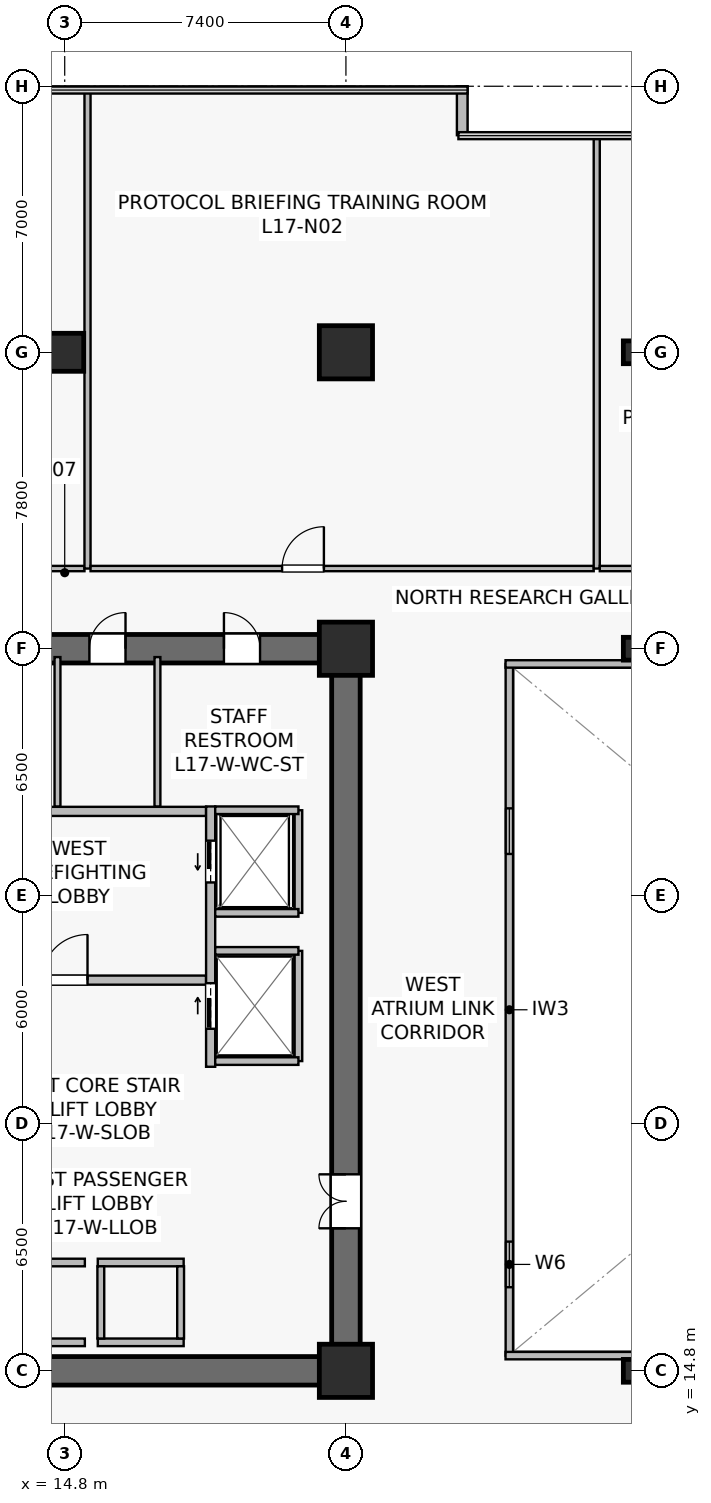
"""IFC4 building model, lengths in metres.
Left out: names, types, materials, properties, quantities, classifications, styles, units other than length and angle.
Written with IfcOpenShell. Run it as: python <this file> out.ifc"""

import sys

from ifc_helpers import new_model, si_unit, direction, frame, frame_2d, origin, origin_2d, place, context, subcontext, project, spatial, rectangle, hollow_rectangle, extrude, source, transform, mapped, element, fill, save


model = new_model("IFC4")
c1 = context("Model", 3, precision=1e-05, world=origin(), true_north=direction((0.0, 1.0)))
c2 = subcontext(c1, "Body", "Model", "MODEL_VIEW")
j1 = project(units=[si_unit("LENGTHUNIT", "METRE"), si_unit("PLANEANGLEUNIT", "RADIAN")], contexts=[c1])
p1 = place(None, origin())
s1 = spatial("IfcSite", under=j1, at=p1, CompositionType="ELEMENT")
p2 = place(p1, origin())
s2 = spatial("IfcBuilding", under=s1, at=p2, CompositionType="ELEMENT")
p3 = place(p2, frame((0.0, 0.0, 70.3)))
s3 = spatial("IfcBuildingStorey", under=s2, at=p3, CompositionType="ELEMENT", Elevation=70.3)
p4 = place(p3, frame((7.025, 14.8, 0.0), z_axis=(0.0, 0.0, 1.0), x_axis=(1.0, 0.0, 0.0)))
e1 = element("IfcWall", 1, at=p4, inside=s3, PredefinedType="SHEAR", context=c2, shape_type="SweptSolid", body=[
    extrude(rectangle(XDim=15.55, YDim=0.75, at=frame_2d((7.775, 0.0))), origin(), (0.0, 0.0, 1.0), 3.78),
])
p5 = place(p3, frame((7.025, 33.8, 0.0), z_axis=(0.0, 0.0, 1.0), x_axis=(1.0, 0.0, 0.0)))
e2 = element("IfcWall", 2, at=p5, inside=s3, PredefinedType="SHEAR", context=c2, shape_type="SweptSolid", body=[
    extrude(rectangle(XDim=15.55, YDim=0.75, at=frame_2d((7.775, 0.0))), origin(), (0.0, 0.0, 1.0), 3.78),
])
p6 = place(p5, frame((8.425, 0.0, 0.0)))
e3 = element("IfcOpeningElement", 3, at=p6, cuts=e2, PredefinedType="OPENING", context=c2, shape_type="SweptSolid", body=[
    extrude(rectangle(XDim=0.95, YDim=2.15, at=frame_2d((0.475, 1.075))), frame((0.0, 0.385, 0.0), z_axis=(0.0, -1.0, 0.0), x_axis=(1.0, 0.0, 0.0)), (0.0, 0.0, 1.0), 0.77),
])
p7 = place(p5, frame((11.965, 0.0, 0.0)))
e4 = element("IfcOpeningElement", 4, at=p7, cuts=e2, PredefinedType="OPENING", context=c2, shape_type="SweptSolid", body=[
    extrude(rectangle(XDim=0.95, YDim=2.15, at=frame_2d((0.475, 1.075))), frame((0.0, 0.385, 0.0), z_axis=(0.0, -1.0, 0.0), x_axis=(1.0, 0.0, 0.0)), (0.0, 0.0, 1.0), 0.77),
])
p8 = place(p3, frame((22.2, 15.175, 0.0), z_axis=(0.0, 0.0, 1.0), x_axis=(0.0, 1.0, 0.0)))
e5 = element("IfcWall", 5, at=p8, inside=s3, PredefinedType="SHEAR", context=c2, shape_type="SweptSolid", body=[
    extrude(rectangle(XDim=18.25, YDim=0.75, at=frame_2d((9.125, 0.0))), origin(), (0.0, 0.0, 1.0), 3.78),
])
p9 = place(p8, frame((3.375, 0.0, 0.0)))
e6 = element("IfcOpeningElement", 6, at=p9, cuts=e5, PredefinedType="OPENING", context=c2, shape_type="SweptSolid", body=[
    extrude(rectangle(XDim=1.42, YDim=2.2, at=frame_2d((0.71, 1.1))), frame((0.0, 0.385, 0.0), z_axis=(0.0, -1.0, 0.0), x_axis=(1.0, 0.0, 0.0)), (0.0, 0.0, 1.0), 0.77),
])
m1 = source(origin(), c2, "Body", "SweptSolid", [
    extrude(rectangle(XDim=1.4, YDim=1.4, at=origin_2d()), origin(), (0.0, 0.0, 1.0), 4.1),
])
for number, where, z_axis, x_axis in (
    (7, (22.2, 14.8, 0.0), (0.0, 0.0, 1.0), (1.0, 0.0, 0.0)),
    (8, (22.2, 33.8, 0.0), (0.0, 0.0, 1.0), (1.0, 0.0, 0.0)),
):
    element("IfcColumn", number, at=place(p3, frame(where, z_axis=z_axis, x_axis=x_axis)), inside=s3, PredefinedType="COLUMN", context=c2, shape_type="MappedRepresentation", body=[
        mapped(m1, transform((0.0, 0.0, 0.0), scale=1.0)),
    ])
m2 = source(origin(), c2, "Body", "SweptSolid", [
    extrude(rectangle(XDim=1.0, YDim=1.0, at=origin_2d()), origin(), (0.0, 0.0, 1.0), 4.1),
])
p10 = place(p3, frame((14.8, 41.6, 0.0), z_axis=(0.0, 0.0, 1.0), x_axis=(1.0, 0.0, 0.0)))
e9 = element("IfcColumn", 9, at=p10, inside=s3, PredefinedType="COLUMN", context=c2, shape_type="MappedRepresentation", body=[
    mapped(m2, transform((0.0, 0.0, 0.0), scale=1.0)),
])
p11 = place(p3, frame((22.2, 41.6, 0.0), z_axis=(0.0, 0.0, 1.0), x_axis=(1.0, 0.0, 0.0)))
e10 = element("IfcColumn", 10, at=p11, inside=s3, PredefinedType="COLUMN", context=c2, shape_type="MappedRepresentation", body=[
    mapped(m1, transform((0.0, 0.0, 0.0), scale=1.0)),
])
m3 = source(origin(), c2, "Body", "SweptSolid", [
    extrude(hollow_rectangle(XDim=0.6, YDim=0.6, WallThickness=0.028, at=origin_2d()), origin(), (0.0, 0.0, 1.0), 4.1),
])
for number, where, z_axis, x_axis in (
    (11, (29.8, 14.8, 0.0), (0.0, 0.0, 1.0), (1.0, 0.0, 0.0)),
    (12, (29.8, 33.8, 0.0), (0.0, 0.0, 1.0), (1.0, 0.0, 0.0)),
    (13, (29.8, 41.6, 0.0), (0.0, 0.0, 1.0), (1.0, 0.0, 0.0)),
):
    element("IfcColumn", number, at=place(p3, frame(where, z_axis=z_axis, x_axis=x_axis)), inside=s3, PredefinedType="COLUMN", context=c2, shape_type="MappedRepresentation", body=[
        mapped(m3, transform((0.0, 0.0, 0.0), scale=1.0)),
    ])
p12 = place(p3, frame((25.26, 47.312, 0.0), z_axis=(0.0, 0.0, 1.0), x_axis=(0.0, 1.0, 0.0)))
e14 = element("IfcWall", 14, at=p12, inside=s3, PredefinedType="STANDARD", context=c2, shape_type="SweptSolid", body=[
    extrude(rectangle(XDim=1.288, YDim=0.28, at=frame_2d((0.644, 0.0))), origin(), (0.0, 0.0, 1.0), 3.78),
])
p13 = place(p3, frame((11.6, 25.08, 0.0), z_axis=(0.0, 0.0, 1.0), x_axis=(1.0, 0.0, 0.0)))
e15 = element("IfcWall", 15, at=p13, inside=s3, PredefinedType="SOLIDWALL", context=c2, shape_type="SweptSolid", body=[
    extrude(rectangle(XDim=6.92, YDim=0.24, at=frame_2d((3.46, 0.0))), origin(), (0.0, 0.0, 1.0), 3.115),
])
p14 = place(p13, frame((2.6, 0.0, 0.0)))
e16 = element("IfcOpeningElement", 16, at=p14, cuts=e15, PredefinedType="OPENING", context=c2, shape_type="SweptSolid", body=[
    extrude(rectangle(XDim=1.2, YDim=2.16, at=frame_2d((0.6, 1.08))), frame((0.0, 0.13, 0.0), z_axis=(0.0, -1.0, 0.0), x_axis=(1.0, 0.0, 0.0)), (0.0, 0.0, 1.0), 0.26),
])
p15 = place(p3, frame((11.6, 29.52, 0.0), z_axis=(0.0, 0.0, 1.0), x_axis=(1.0, 0.0, 0.0)))
e17 = element("IfcWall", 17, at=p15, inside=s3, PredefinedType="SOLIDWALL", context=c2, shape_type="SweptSolid", body=[
    extrude(rectangle(XDim=6.92, YDim=0.24, at=frame_2d((3.46, 0.0))), origin(), (0.0, 0.0, 1.0), 3.115),
])
p16 = place(p3, frame((18.64, 22.8, 0.0), z_axis=(0.0, 0.0, 1.0), x_axis=(0.0, 1.0, 0.0)))
e18 = element("IfcWall", 18, at=p16, inside=s3, PredefinedType="SOLIDWALL", context=c2, shape_type="SweptSolid", body=[
    extrude(rectangle(XDim=6.85, YDim=0.24, at=frame_2d((3.425, 0.0))), origin(), (0.0, 0.0, 1.0), 2.865),
])
p17 = place(p16, frame((4.85, 0.0, 0.0)))
e19 = element("IfcOpeningElement", 19, at=p17, cuts=e18, PredefinedType="OPENING", context=c2, shape_type="SweptSolid", body=[
    extrude(rectangle(XDim=1.1, YDim=2.22, at=frame_2d((0.55, 1.11))), frame((0.0, 0.13, 0.0), z_axis=(0.0, -1.0, 0.0), x_axis=(1.0, 0.0, 0.0)), (0.0, 0.0, 1.0), 0.26),
])
p18 = place(p16, frame((1.0, 0.0, 0.0)))
e20 = element("IfcOpeningElement", 20, at=p18, cuts=e18, PredefinedType="OPENING", context=c2, shape_type="SweptSolid", body=[
    extrude(rectangle(XDim=1.2, YDim=2.22, at=frame_2d((0.6, 1.11))), frame((0.0, 0.13, 0.0), z_axis=(0.0, -1.0, 0.0), x_axis=(1.0, 0.0, 0.0)), (0.0, 0.0, 1.0), 0.26),
])
for number, where, z_axis, x_axis in (
    (21, (13.07, 17.65, 0.0), (0.0, 0.0, 1.0), (1.0, 0.0, 0.0)),
    (22, (13.07, 15.55, 0.0), (0.0, 0.0, 1.0), (1.0, 0.0, 0.0)),
):
    element("IfcWall", number, at=place(p3, frame(where, z_axis=z_axis, x_axis=x_axis)), inside=s3, PredefinedType="SOLIDWALL", context=c2, shape_type="SweptSolid", body=[
        extrude(rectangle(XDim=2.26, YDim=0.2, at=frame_2d((1.13, 0.0))), origin(), (0.0, 0.0, 1.0), 3.115),
    ])
for number, where, z_axis, x_axis in (
    (23, (15.67, 17.65, 0.0), (0.0, 0.0, 1.0), (1.0, 0.0, 0.0)),
    (24, (15.67, 15.55, 0.0), (0.0, 0.0, 1.0), (1.0, 0.0, 0.0)),
):
    element("IfcWall", number, at=place(p3, frame(where, z_axis=z_axis, x_axis=x_axis)), inside=s3, PredefinedType="SOLIDWALL", context=c2, shape_type="SweptSolid", body=[
        extrude(rectangle(XDim=2.26, YDim=0.2, at=frame_2d((1.13, 0.0))), origin(), (0.0, 0.0, 1.0), 3.78),
    ])
for number, where, z_axis, x_axis in (
    (25, (15.75, 15.65, 0.0), (0.0, 0.0, 1.0), (0.0, 1.0, 0.0)),
    (26, (17.85, 15.65, 0.0), (0.0, 0.0, 1.0), (0.0, 1.0, 0.0)),
):
    element("IfcWall", number, at=place(p3, frame(where, z_axis=z_axis, x_axis=x_axis)), inside=s3, PredefinedType="SOLIDWALL", context=c2, shape_type="SweptSolid", body=[
        extrude(rectangle(XDim=1.9, YDim=0.18, at=frame_2d((0.95, 0.0))), origin(), (0.0, 0.0, 1.0), 3.78),
    ])
p19 = place(p3, frame((20.95, 26.85, 0.0), z_axis=(0.0, 0.0, 1.0), x_axis=(0.0, 1.0, 0.0)))
e27 = element("IfcWall", 27, at=p19, inside=s3, PredefinedType="SOLIDWALL", context=c2, shape_type="SweptSolid", body=[
    extrude(rectangle(XDim=2.7, YDim=0.2, at=frame_2d((1.35, 0.0))), origin(), (0.0, 0.0, 1.0), 3.78),
])
p20 = place(p3, frame((18.76, 29.55, 0.0), z_axis=(0.0, 0.0, 1.0), x_axis=(1.0, 0.0, 0.0)))
e28 = element("IfcWall", 28, at=p20, inside=s3, PredefinedType="SOLIDWALL", context=c2, shape_type="SweptSolid", body=[
    extrude(rectangle(XDim=2.19, YDim=0.2, at=frame_2d((1.095, 0.0))), origin(), (0.0, 0.0, 1.0), 3.78),
])
p21 = place(p3, frame((18.76, 26.85, 0.0), z_axis=(0.0, 0.0, 1.0), x_axis=(1.0, 0.0, 0.0)))
e29 = element("IfcWall", 29, at=p21, inside=s3, PredefinedType="SOLIDWALL", context=c2, shape_type="SweptSolid", body=[
    extrude(rectangle(XDim=2.19, YDim=0.2, at=frame_2d((1.095, 0.0))), origin(), (0.0, 0.0, 1.0), 3.177),
])
p22 = place(p3, frame((20.95, 22.95, 0.0), z_axis=(0.0, 0.0, 1.0), x_axis=(0.0, 1.0, 0.0)))
e30 = element("IfcWall", 30, at=p22, inside=s3, PredefinedType="SOLIDWALL", context=c2, shape_type="SweptSolid", body=[
    extrude(rectangle(XDim=2.9, YDim=0.2, at=frame_2d((1.45, 0.0))), origin(), (0.0, 0.0, 1.0), 2.865),
])
for number, where, z_axis, x_axis in (
    (31, (18.76, 25.85, 0.0), (0.0, 0.0, 1.0), (1.0, 0.0, 0.0)),
    (32, (18.76, 22.95, 0.0), (0.0, 0.0, 1.0), (1.0, 0.0, 0.0)),
):
    element("IfcWall", number, at=place(p3, frame(where, z_axis=z_axis, x_axis=x_axis)), inside=s3, PredefinedType="SOLIDWALL", context=c2, shape_type="SweptSolid", body=[
        extrude(rectangle(XDim=2.19, YDim=0.2, at=frame_2d((1.095, 0.0))), origin(), (0.0, 0.0, 1.0), 3.78),
    ])
p23 = place(p3, frame((14.61, 29.65, 0.0), z_axis=(0.0, 0.0, 1.0), x_axis=(0.0, 1.0, 0.0)))
e33 = element("IfcWall", 33, at=p23, inside=s3, PredefinedType="PLUMBINGWALL", context=c2, shape_type="SweptSolid", body=[
    extrude(rectangle(XDim=3.93, YDim=0.155, at=frame_2d((1.965, 0.0))), origin(), (0.0, 0.0, 1.0), 3.115),
])
p24 = place(p3, frame((17.24, 29.65, 0.0), z_axis=(0.0, 0.0, 1.0), x_axis=(0.0, 1.0, 0.0)))
e34 = element("IfcWall", 34, at=p24, inside=s3, PredefinedType="PLUMBINGWALL", context=c2, shape_type="SweptSolid", body=[
    extrude(rectangle(XDim=3.93, YDim=0.155, at=frame_2d((1.965, 0.0))), origin(), (0.0, 0.0, 1.0), 3.78),
])
p25 = place(p3, frame((26.5, 15.2, 0.0), z_axis=(0.0, 0.0, 1.0), x_axis=(0.0, 1.0, 0.0)))
e35 = element("IfcWall", 35, at=p25, inside=s3, PredefinedType="SOLIDWALL", context=c2, shape_type="SweptSolid", body=[
    extrude(rectangle(XDim=18.2, YDim=0.195, at=frame_2d((9.1, 0.0))), origin(), (0.0, 0.0, 1.0), 3.78),
])
p26 = place(p25, frame((1.8, 0.0, 0.9)))
e36 = element("IfcOpeningElement", 36, at=p26, cuts=e35, PredefinedType="OPENING", context=c2, shape_type="SweptSolid", body=[
    extrude(rectangle(XDim=1.2, YDim=1.35, at=frame_2d((0.6, 0.675))), frame((0.0, 0.107, 0.0), z_axis=(0.0, -1.0, 0.0), x_axis=(1.0, 0.0, 0.0)), (0.0, 0.0, 1.0), 0.215),
])
p27 = place(p25, frame((13.2, 0.0, 0.9)))
e37 = element("IfcOpeningElement", 37, at=p27, cuts=e35, PredefinedType="OPENING", context=c2, shape_type="SweptSolid", body=[
    extrude(rectangle(XDim=1.2, YDim=1.35, at=frame_2d((0.6, 0.675))), frame((0.0, 0.107, 0.0), z_axis=(0.0, -1.0, 0.0), x_axis=(1.0, 0.0, 0.0)), (0.0, 0.0, 1.0), 0.215),
])
for number, where, z_axis, x_axis in (
    (38, (26.4, 15.2, 0.0), (0.0, 0.0, 1.0), (1.0, 0.0, 0.0)),
    (39, (26.4, 33.4, 0.0), (0.0, 0.0, 1.0), (1.0, 0.0, 0.0)),
):
    element("IfcWall", number, at=place(p3, frame(where, z_axis=z_axis, x_axis=x_axis)), inside=s3, PredefinedType="SOLIDWALL", context=c2, shape_type="SweptSolid", body=[
        extrude(rectangle(XDim=22.0, YDim=0.195, at=frame_2d((11.0, 0.0))), origin(), (0.0, 0.0, 1.0), 3.78),
    ])
p28 = place(p3, frame((6.98, 35.91, 0.0), z_axis=(0.0, 0.0, 1.0), x_axis=(1.0, 0.0, 0.0)))
e40 = element("IfcWall", 40, at=p28, inside=s3, PredefinedType="PARTITIONING", context=c2, shape_type="SweptSolid", body=[
    extrude(rectangle(XDim=8.34, YDim=0.14, at=frame_2d((4.17, 0.0))), origin(), (0.0, 0.0, 1.0), 3.115),
])
p29 = place(p28, frame((3.816, 0.0, 0.0)))
e41 = element("IfcOpeningElement", 41, at=p29, cuts=e40, PredefinedType="OPENING", context=c2, shape_type="SweptSolid", body=[
    extrude(rectangle(XDim=1.1, YDim=2.18, at=frame_2d((0.55, 1.09))), frame((0.0, 0.08, 0.0), z_axis=(0.0, -1.0, 0.0), x_axis=(1.0, 0.0, 0.0)), (0.0, 0.0, 1.0), 0.16),
])
p30 = place(p3, frame((15.4, 35.91, 0.0), z_axis=(0.0, 0.0, 1.0), x_axis=(0.0, 1.0, 0.0)))
e42 = element("IfcWall", 42, at=p30, inside=s3, PredefinedType="PARTITIONING", context=c2, shape_type="SweptSolid", body=[
    extrude(rectangle(XDim=12.58, YDim=0.16, at=frame_2d((6.29, 0.0))), origin(), (0.0, 0.0, 1.0), 3.015),
])
p31 = place(p3, frame((15.48, 35.91, 0.0), z_axis=(0.0, 0.0, 1.0), x_axis=(1.0, 0.0, 0.0)))
e43 = element("IfcWall", 43, at=p31, inside=s3, PredefinedType="PARTITIONING", context=c2, shape_type="SweptSolid", body=[
    extrude(rectangle(XDim=13.24, YDim=0.14, at=frame_2d((6.62, 0.0))), origin(), (0.0, 0.0, 1.0), 3.115),
])
p32 = place(p31, frame((5.04, 0.0, 0.0)))
e44 = element("IfcOpeningElement", 44, at=p32, cuts=e43, PredefinedType="OPENING", context=c2, shape_type="SweptSolid", body=[
    extrude(rectangle(XDim=1.1, YDim=2.18, at=frame_2d((0.55, 1.09))), frame((0.0, 0.08, 0.0), z_axis=(0.0, -1.0, 0.0), x_axis=(1.0, 0.0, 0.0)), (0.0, 0.0, 1.0), 0.16),
])
p33 = place(p3, frame((28.8, 35.91, 0.0), z_axis=(0.0, 0.0, 1.0), x_axis=(0.0, 1.0, 0.0)))
e45 = element("IfcWall", 45, at=p33, inside=s3, PredefinedType="PARTITIONING", context=c2, shape_type="SweptSolid", body=[
    extrude(rectangle(XDim=11.38, YDim=0.16, at=frame_2d((5.69, 0.0))), origin(), (0.0, 0.0, 1.0), 3.015),
])
p34 = place(p3, frame((28.88, 35.91, 0.0), z_axis=(0.0, 0.0, 1.0), x_axis=(1.0, 0.0, 0.0)))
e46 = element("IfcWall", 46, at=p34, inside=s3, PredefinedType="PARTITIONING", context=c2, shape_type="SweptSolid", body=[
    extrude(rectangle(XDim=16.04, YDim=0.14, at=frame_2d((8.02, 0.0))), origin(), (0.0, 0.0, 1.0), 3.115),
])
p35 = place(p34, frame((7.897, 0.0, 0.0)))
e47 = element("IfcOpeningElement", 47, at=p35, cuts=e46, PredefinedType="OPENING", context=c2, shape_type="SweptSolid", body=[
    extrude(rectangle(XDim=1.1, YDim=2.18, at=frame_2d((0.55, 1.09))), frame((0.0, 0.08, 0.0), z_axis=(0.0, -1.0, 0.0), x_axis=(1.0, 0.0, 0.0)), (0.0, 0.0, 1.0), 0.16),
])
m4 = source(origin(), c2, "Body", "SweptSolid", [
    extrude(rectangle(XDim=1.2, YDim=1.35, at=frame_2d((0.6, 0.675))), frame((0.0, 0.03, 0.0), z_axis=(0.0, -1.0, 0.0), x_axis=(1.0, 0.0, 0.0)), (0.0, 0.0, 1.0), 0.06),
])
p36 = place(p26, origin())
e48 = element("IfcWindow", 48, at=p36, inside=s3, PartitioningType="SINGLE_PANEL", PredefinedType="WINDOW", context=c2, shape_type="MappedRepresentation", body=[
    mapped(m4, transform((0.0, 0.0, 0.0), scale=1.0)),
])
fill(e36, e48)
p37 = place(p27, origin())
e49 = element("IfcWindow", 49, at=p37, inside=s3, PartitioningType="SINGLE_PANEL", PredefinedType="WINDOW", context=c2, shape_type="MappedRepresentation", body=[
    mapped(m4, transform((0.0, 0.0, 0.0), scale=1.0)),
])
fill(e37, e49)
m5 = source(origin(), c2, "Body", "SweptSolid", [
    extrude(rectangle(XDim=1.2, YDim=2.16, at=frame_2d((0.6, 1.08))), frame((0.0, 0.025, 0.0), z_axis=(0.0, -1.0, 0.0), x_axis=(1.0, 0.0, 0.0)), (0.0, 0.0, 1.0), 0.05),
])
p38 = place(p14, origin())
e50 = element("IfcDoor", 50, at=p38, inside=s3, OperationType="SINGLE_SWING_RIGHT", PredefinedType="DOOR", context=c2, shape_type="MappedRepresentation", body=[
    mapped(m5, transform((0.0, 0.0, 0.0), scale=1.0)),
])
fill(e16, e50)
m6 = source(origin(), c2, "Body", "SweptSolid", [
    extrude(rectangle(XDim=1.1, YDim=2.22, at=frame_2d((0.55, 1.11))), frame((0.0, 0.025, 0.0), z_axis=(0.0, -1.0, 0.0), x_axis=(1.0, 0.0, 0.0)), (0.0, 0.0, 1.0), 0.05),
])
p39 = place(p17, origin())
e51 = element("IfcDoor", 51, at=p39, inside=s3, OperationType="SLIDING_TO_LEFT", PredefinedType="USERDEFINED", context=c2, shape_type="MappedRepresentation", body=[
    mapped(m6, transform((0.0, 0.0, 0.0), scale=1.0)),
])
fill(e19, e51)
m7 = source(origin(), c2, "Body", "SweptSolid", [
    extrude(rectangle(XDim=1.2, YDim=2.22, at=frame_2d((0.6, 1.11))), frame((0.0, 0.025, 0.0), z_axis=(0.0, -1.0, 0.0), x_axis=(1.0, 0.0, 0.0)), (0.0, 0.0, 1.0), 0.05),
])
p40 = place(p18, origin())
e52 = element("IfcDoor", 52, at=p40, inside=s3, OperationType="SLIDING_TO_RIGHT", PredefinedType="USERDEFINED", context=c2, shape_type="MappedRepresentation", body=[
    mapped(m7, transform((0.0, 0.0, 0.0), scale=1.0)),
])
fill(e20, e52)
m8 = source(origin(), c2, "Body", "SweptSolid", [
    extrude(rectangle(XDim=1.42, YDim=2.2, at=frame_2d((0.71, 1.1))), frame((0.0, 0.025, 0.0), z_axis=(0.0, -1.0, 0.0), x_axis=(1.0, 0.0, 0.0)), (0.0, 0.0, 1.0), 0.05),
])
p41 = place(p9, origin())
e53 = element("IfcDoor", 53, at=p41, inside=s3, OperationType="DOUBLE_DOOR_SINGLE_SWING", PredefinedType="DOOR", context=c2, shape_type="MappedRepresentation", body=[
    mapped(m8, transform((0.0, 0.0, 0.0), scale=1.0)),
])
fill(e6, e53)
m9 = source(origin(), c2, "Body", "SweptSolid", [
    extrude(rectangle(XDim=0.95, YDim=2.15, at=frame_2d((0.475, 1.075))), frame((0.0, 0.025, 0.0), z_axis=(0.0, -1.0, 0.0), x_axis=(1.0, 0.0, 0.0)), (0.0, 0.0, 1.0), 0.05),
])
p42 = place(p6, origin())
e54 = element("IfcDoor", 54, at=p42, inside=s3, OperationType="SINGLE_SWING_RIGHT", PredefinedType="DOOR", context=c2, shape_type="MappedRepresentation", body=[
    mapped(m9, transform((0.0, 0.0, 0.0), scale=1.0)),
])
fill(e3, e54)
p43 = place(p7, origin())
e55 = element("IfcDoor", 55, at=p43, inside=s3, OperationType="SINGLE_SWING_LEFT", PredefinedType="DOOR", context=c2, shape_type="MappedRepresentation", body=[
    mapped(m9, transform((0.0, 0.0, 0.0), scale=1.0)),
])
fill(e4, e55)
m10 = source(origin(), c2, "Body", "SweptSolid", [
    extrude(rectangle(XDim=1.1, YDim=2.18, at=frame_2d((0.55, 1.09))), frame((0.0, 0.025, 0.0), z_axis=(0.0, -1.0, 0.0), x_axis=(1.0, 0.0, 0.0)), (0.0, 0.0, 1.0), 0.05),
])
p44 = place(p32, origin())
e56 = element("IfcDoor", 56, at=p44, inside=s3, OperationType="SINGLE_SWING_RIGHT", PredefinedType="DOOR", context=c2, shape_type="MappedRepresentation", body=[
    mapped(m10, transform((0.0, 0.0, 0.0), scale=1.0)),
])
fill(e44, e56)
save(model, sys.argv[1])
